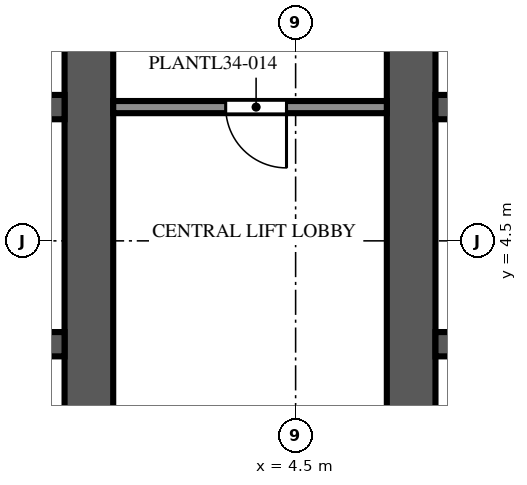
"""IFC4 building model, lengths in metres.
Left out: names, types, materials, properties, quantities, classifications, styles, units other than length and angle.
Written with IfcOpenShell. Run it as: python <this file> out.ifc"""

import sys

from ifc_helpers import new_model, si_unit, direction, frame, frame_2d, origin, place, context, subcontext, project, spatial, rectangle, extrude, element, fill, save


model = new_model("IFC4")
c1 = context("Model", 3, precision=1e-05, world=origin(), true_north=direction((0.0, 1.0)))
c2 = subcontext(c1, "Body", "Model", "MODEL_VIEW")
j1 = project(units=[si_unit("LENGTHUNIT", "METRE"), si_unit("PLANEANGLEUNIT", "RADIAN")], contexts=[c1])
p1 = place(None, origin())
s1 = spatial("IfcSite", under=j1, at=p1, CompositionType="ELEMENT")
p2 = place(p1, origin())
s2 = spatial("IfcBuilding", under=s1, at=p2, CompositionType="ELEMENT")
p3 = place(p2, frame((0.0, 0.0, 151.4)))
s3 = spatial("IfcBuildingStorey", under=s2, at=p3, CompositionType="ELEMENT", Elevation=151.4)
p4 = place(p3, frame((1.1, -9.0, 0.0), z_axis=(0.0, 0.0, 1.0), x_axis=(0.0, 1.0, 0.0)))
e1 = element("IfcWall", 1, at=p4, inside=s3, PredefinedType="SHEAR", context=c2, shape_type="SweptSolid", body=[
    extrude(rectangle(XDim=27.5, YDim=0.8, at=frame_2d((13.75, 0.0))), origin(), (0.0, 0.0, 1.0), 5.4),
])
p5 = place(p4, frame((12.55, 0.0, 0.0)))
e2 = element("IfcOpeningElement", 2, at=p5, cuts=e1, PredefinedType="OPENING", context=c2, shape_type="SweptSolid", body=[
    extrude(rectangle(XDim=2.4, YDim=2.4, at=frame_2d((1.2, 1.2))), frame((0.0, 0.41, 0.0), z_axis=(0.0, -1.0, 0.0), x_axis=(1.0, 0.0, 0.0)), (0.0, 0.0, 1.0), 0.82),
])
p6 = place(p4, frame((5.45, 0.0, 0.0)))
e3 = element("IfcOpeningElement", 3, at=p6, cuts=e1, PredefinedType="OPENING", context=c2, shape_type="SweptSolid", body=[
    extrude(rectangle(XDim=1.2, YDim=2.1, at=frame_2d((0.6, 1.05))), frame((0.0, 0.41, 0.0), z_axis=(0.0, -1.0, 0.0), x_axis=(1.0, 0.0, 0.0)), (0.0, 0.0, 1.0), 0.82),
])
p7 = place(p4, frame((19.45, 0.0, 0.0)))
e4 = element("IfcOpeningElement", 4, at=p7, cuts=e1, PredefinedType="OPENING", context=c2, shape_type="SweptSolid", body=[
    extrude(rectangle(XDim=1.0, YDim=2.1, at=frame_2d((0.5, 1.05))), frame((0.0, 0.41, 0.0), z_axis=(0.0, -1.0, 0.0), x_axis=(1.0, 0.0, 0.0)), (0.0, 0.0, 1.0), 0.82),
])
p8 = place(p4, frame((21.137, 0.0, 0.0)))
e5 = element("IfcOpeningElement", 5, at=p8, cuts=e1, PredefinedType="OPENING", context=c2, shape_type="SweptSolid", body=[
    extrude(rectangle(XDim=1.0, YDim=2.1, at=frame_2d((0.5, 1.05))), frame((0.0, 0.41, 0.0), z_axis=(0.0, -1.0, 0.0), x_axis=(1.0, 0.0, 0.0)), (0.0, 0.0, 1.0), 0.82),
])
p9 = place(p4, frame((23.2, 0.0, 0.0)))
e6 = element("IfcOpeningElement", 6, at=p9, cuts=e1, PredefinedType="OPENING", context=c2, shape_type="SweptSolid", body=[
    extrude(rectangle(XDim=1.0, YDim=2.1, at=frame_2d((0.5, 1.05))), frame((0.0, 0.41, 0.0), z_axis=(0.0, -1.0, 0.0), x_axis=(1.0, 0.0, 0.0)), (0.0, 0.0, 1.0), 0.82),
])
p10 = place(p4, frame((25.262, 0.0, 0.0)))
e7 = element("IfcOpeningElement", 7, at=p10, cuts=e1, PredefinedType="OPENING", context=c2, shape_type="SweptSolid", body=[
    extrude(rectangle(XDim=1.0, YDim=2.1, at=frame_2d((0.5, 1.05))), frame((0.0, 0.41, 0.0), z_axis=(0.0, -1.0, 0.0), x_axis=(1.0, 0.0, 0.0)), (0.0, 0.0, 1.0), 0.82),
])
p11 = place(p3, frame((-9.7, 2.8, 0.0), z_axis=(0.0, 0.0, 1.0), x_axis=(1.0, 0.0, 0.0)))
e8 = element("IfcWall", 8, at=p11, inside=s3, PredefinedType="SHEAR", context=c2, shape_type="SweptSolid", body=[
    extrude(rectangle(XDim=10.4, YDim=0.4, at=frame_2d((5.2, 0.0))), origin(), (0.0, 0.0, 1.0), 5.4),
])
p12 = place(p11, frame((0.738, 0.0, 0.0)))
e9 = element("IfcOpeningElement", 9, at=p12, cuts=e8, PredefinedType="OPENING", context=c2, shape_type="SweptSolid", body=[
    extrude(rectangle(XDim=1.1, YDim=2.1, at=frame_2d((0.55, 1.05))), frame((0.0, 0.21, 0.0), z_axis=(0.0, -1.0, 0.0), x_axis=(1.0, 0.0, 0.0)), (0.0, 0.0, 1.0), 0.42),
])
p13 = place(p11, frame((3.337, 0.0, 0.0)))
e10 = element("IfcOpeningElement", 10, at=p13, cuts=e8, PredefinedType="OPENING", context=c2, shape_type="SweptSolid", body=[
    extrude(rectangle(XDim=1.1, YDim=2.1, at=frame_2d((0.55, 1.05))), frame((0.0, 0.21, 0.0), z_axis=(0.0, -1.0, 0.0), x_axis=(1.0, 0.0, 0.0)), (0.0, 0.0, 1.0), 0.42),
])
p14 = place(p11, frame((5.962, 0.0, 0.0)))
e11 = element("IfcOpeningElement", 11, at=p14, cuts=e8, PredefinedType="OPENING", context=c2, shape_type="SweptSolid", body=[
    extrude(rectangle(XDim=1.1, YDim=2.1, at=frame_2d((0.55, 1.05))), frame((0.0, 0.21, 0.0), z_axis=(0.0, -1.0, 0.0), x_axis=(1.0, 0.0, 0.0)), (0.0, 0.0, 1.0), 0.42),
])
p15 = place(p11, frame((8.613, 0.0, 0.0)))
e12 = element("IfcOpeningElement", 12, at=p15, cuts=e8, PredefinedType="OPENING", context=c2, shape_type="SweptSolid", body=[
    extrude(rectangle(XDim=1.0, YDim=2.1, at=frame_2d((0.5, 1.05))), frame((0.0, 0.21, 0.0), z_axis=(0.0, -1.0, 0.0), x_axis=(1.0, 0.0, 0.0)), (0.0, 0.0, 1.0), 0.42),
])
p16 = place(p3, frame((-9.7, 6.7, 0.0), z_axis=(0.0, 0.0, 1.0), x_axis=(1.0, 0.0, 0.0)))
e13 = element("IfcWall", 13, at=p16, inside=s3, PredefinedType="SHEAR", context=c2, shape_type="SweptSolid", body=[
    extrude(rectangle(XDim=10.4, YDim=0.4, at=frame_2d((5.2, 0.0))), origin(), (0.0, 0.0, 1.0), 5.4),
])
p17 = place(p16, frame((3.337, 0.0, 0.0)))
e14 = element("IfcOpeningElement", 14, at=p17, cuts=e13, PredefinedType="OPENING", context=c2, shape_type="SweptSolid", body=[
    extrude(rectangle(XDim=1.1, YDim=2.1, at=frame_2d((0.55, 1.05))), frame((0.0, 0.21, 0.0), z_axis=(0.0, -1.0, 0.0), x_axis=(1.0, 0.0, 0.0)), (0.0, 0.0, 1.0), 0.42),
])
p18 = place(p16, frame((5.962, 0.0, 0.0)))
e15 = element("IfcOpeningElement", 15, at=p18, cuts=e13, PredefinedType="OPENING", context=c2, shape_type="SweptSolid", body=[
    extrude(rectangle(XDim=1.1, YDim=2.1, at=frame_2d((0.55, 1.05))), frame((0.0, 0.21, 0.0), z_axis=(0.0, -1.0, 0.0), x_axis=(1.0, 0.0, 0.0)), (0.0, 0.0, 1.0), 0.42),
])
p19 = place(p16, frame((8.663, 0.0, 0.0)))
e16 = element("IfcOpeningElement", 16, at=p19, cuts=e13, PredefinedType="OPENING", context=c2, shape_type="SweptSolid", body=[
    extrude(rectangle(XDim=1.1, YDim=2.1, at=frame_2d((0.55, 1.05))), frame((0.0, 0.21, 0.0), z_axis=(0.0, -1.0, 0.0), x_axis=(1.0, 0.0, 0.0)), (0.0, 0.0, 1.0), 0.42),
])
p20 = place(p16, frame((0.688, 0.0, 0.0)))
e17 = element("IfcOpeningElement", 17, at=p20, cuts=e13, PredefinedType="OPENING", context=c2, shape_type="SweptSolid", body=[
    extrude(rectangle(XDim=1.0, YDim=2.1, at=frame_2d((0.5, 1.05))), frame((0.0, 0.21, 0.0), z_axis=(0.0, -1.0, 0.0), x_axis=(1.0, 0.0, 0.0)), (0.0, 0.0, 1.0), 0.42),
])
p21 = place(p3, frame((6.4, -9.0, 0.0), z_axis=(0.0, 0.0, 1.0), x_axis=(0.0, 1.0, 0.0)))
e18 = element("IfcWall", 18, at=p21, inside=s3, PredefinedType="SHEAR", context=c2, shape_type="SweptSolid", body=[
    extrude(rectangle(XDim=27.5, YDim=0.8, at=frame_2d((13.75, 0.0))), origin(), (0.0, 0.0, 1.0), 5.4),
])
p22 = place(p21, frame((12.55, 0.0, 0.0)))
e19 = element("IfcOpeningElement", 19, at=p22, cuts=e18, PredefinedType="OPENING", context=c2, shape_type="SweptSolid", body=[
    extrude(rectangle(XDim=2.4, YDim=2.4, at=frame_2d((1.2, 1.2))), frame((0.0, 0.41, 0.0), z_axis=(0.0, -1.0, 0.0), x_axis=(1.0, 0.0, 0.0)), (0.0, 0.0, 1.0), 0.82),
])
p23 = place(p21, frame((5.45, 0.0, 0.0)))
e20 = element("IfcOpeningElement", 20, at=p23, cuts=e18, PredefinedType="OPENING", context=c2, shape_type="SweptSolid", body=[
    extrude(rectangle(XDim=1.2, YDim=2.1, at=frame_2d((0.6, 1.05))), frame((0.0, 0.41, 0.0), z_axis=(0.0, -1.0, 0.0), x_axis=(1.0, 0.0, 0.0)), (0.0, 0.0, 1.0), 0.82),
])
p24 = place(p21, frame((19.45, 0.0, 0.0)))
e21 = element("IfcOpeningElement", 21, at=p24, cuts=e18, PredefinedType="OPENING", context=c2, shape_type="SweptSolid", body=[
    extrude(rectangle(XDim=1.0, YDim=2.1, at=frame_2d((0.5, 1.05))), frame((0.0, 0.41, 0.0), z_axis=(0.0, -1.0, 0.0), x_axis=(1.0, 0.0, 0.0)), (0.0, 0.0, 1.0), 0.82),
])
p25 = place(p21, frame((21.137, 0.0, 0.0)))
e22 = element("IfcOpeningElement", 22, at=p25, cuts=e18, PredefinedType="OPENING", context=c2, shape_type="SweptSolid", body=[
    extrude(rectangle(XDim=1.0, YDim=2.1, at=frame_2d((0.5, 1.05))), frame((0.0, 0.41, 0.0), z_axis=(0.0, -1.0, 0.0), x_axis=(1.0, 0.0, 0.0)), (0.0, 0.0, 1.0), 0.82),
])
p26 = place(p21, frame((23.2, 0.0, 0.0)))
e23 = element("IfcOpeningElement", 23, at=p26, cuts=e18, PredefinedType="OPENING", context=c2, shape_type="SweptSolid", body=[
    extrude(rectangle(XDim=1.0, YDim=2.1, at=frame_2d((0.5, 1.05))), frame((0.0, 0.41, 0.0), z_axis=(0.0, -1.0, 0.0), x_axis=(1.0, 0.0, 0.0)), (0.0, 0.0, 1.0), 0.82),
])
p27 = place(p21, frame((25.262, 0.0, 0.0)))
e24 = element("IfcOpeningElement", 24, at=p27, cuts=e18, PredefinedType="OPENING", context=c2, shape_type="SweptSolid", body=[
    extrude(rectangle(XDim=1.0, YDim=2.1, at=frame_2d((0.5, 1.05))), frame((0.0, 0.41, 0.0), z_axis=(0.0, -1.0, 0.0), x_axis=(1.0, 0.0, 0.0)), (0.0, 0.0, 1.0), 0.82),
])
p28 = place(p3, frame((6.8, 2.8, 0.0), z_axis=(0.0, 0.0, 1.0), x_axis=(1.0, 0.0, 0.0)))
e25 = element("IfcWall", 25, at=p28, inside=s3, PredefinedType="SHEAR", context=c2, shape_type="SweptSolid", body=[
    extrude(rectangle(XDim=10.4, YDim=0.4, at=frame_2d((5.2, 0.0))), origin(), (0.0, 0.0, 1.0), 5.4),
])
p29 = place(p28, frame((0.738, 0.0, 0.0)))
e26 = element("IfcOpeningElement", 26, at=p29, cuts=e25, PredefinedType="OPENING", context=c2, shape_type="SweptSolid", body=[
    extrude(rectangle(XDim=1.1, YDim=2.1, at=frame_2d((0.55, 1.05))), frame((0.0, 0.21, 0.0), z_axis=(0.0, -1.0, 0.0), x_axis=(1.0, 0.0, 0.0)), (0.0, 0.0, 1.0), 0.42),
])
p30 = place(p28, frame((3.337, 0.0, 0.0)))
e27 = element("IfcOpeningElement", 27, at=p30, cuts=e25, PredefinedType="OPENING", context=c2, shape_type="SweptSolid", body=[
    extrude(rectangle(XDim=1.1, YDim=2.1, at=frame_2d((0.55, 1.05))), frame((0.0, 0.21, 0.0), z_axis=(0.0, -1.0, 0.0), x_axis=(1.0, 0.0, 0.0)), (0.0, 0.0, 1.0), 0.42),
])
p31 = place(p28, frame((5.962, 0.0, 0.0)))
e28 = element("IfcOpeningElement", 28, at=p31, cuts=e25, PredefinedType="OPENING", context=c2, shape_type="SweptSolid", body=[
    extrude(rectangle(XDim=1.1, YDim=2.1, at=frame_2d((0.55, 1.05))), frame((0.0, 0.21, 0.0), z_axis=(0.0, -1.0, 0.0), x_axis=(1.0, 0.0, 0.0)), (0.0, 0.0, 1.0), 0.42),
])
p32 = place(p28, frame((8.613, 0.0, 0.0)))
e29 = element("IfcOpeningElement", 29, at=p32, cuts=e25, PredefinedType="OPENING", context=c2, shape_type="SweptSolid", body=[
    extrude(rectangle(XDim=1.0, YDim=2.1, at=frame_2d((0.5, 1.05))), frame((0.0, 0.21, 0.0), z_axis=(0.0, -1.0, 0.0), x_axis=(1.0, 0.0, 0.0)), (0.0, 0.0, 1.0), 0.42),
])
p33 = place(p3, frame((6.8, 6.7, 0.0), z_axis=(0.0, 0.0, 1.0), x_axis=(1.0, 0.0, 0.0)))
e30 = element("IfcWall", 30, at=p33, inside=s3, PredefinedType="SHEAR", context=c2, shape_type="SweptSolid", body=[
    extrude(rectangle(XDim=10.4, YDim=0.4, at=frame_2d((5.2, 0.0))), origin(), (0.0, 0.0, 1.0), 5.4),
])
p34 = place(p33, frame((3.337, 0.0, 0.0)))
e31 = element("IfcOpeningElement", 31, at=p34, cuts=e30, PredefinedType="OPENING", context=c2, shape_type="SweptSolid", body=[
    extrude(rectangle(XDim=1.1, YDim=2.1, at=frame_2d((0.55, 1.05))), frame((0.0, 0.21, 0.0), z_axis=(0.0, -1.0, 0.0), x_axis=(1.0, 0.0, 0.0)), (0.0, 0.0, 1.0), 0.42),
])
p35 = place(p33, frame((5.962, 0.0, 0.0)))
e32 = element("IfcOpeningElement", 32, at=p35, cuts=e30, PredefinedType="OPENING", context=c2, shape_type="SweptSolid", body=[
    extrude(rectangle(XDim=1.1, YDim=2.1, at=frame_2d((0.55, 1.05))), frame((0.0, 0.21, 0.0), z_axis=(0.0, -1.0, 0.0), x_axis=(1.0, 0.0, 0.0)), (0.0, 0.0, 1.0), 0.42),
])
p36 = place(p33, frame((8.663, 0.0, 0.0)))
e33 = element("IfcOpeningElement", 33, at=p36, cuts=e30, PredefinedType="OPENING", context=c2, shape_type="SweptSolid", body=[
    extrude(rectangle(XDim=1.1, YDim=2.1, at=frame_2d((0.55, 1.05))), frame((0.0, 0.21, 0.0), z_axis=(0.0, -1.0, 0.0), x_axis=(1.0, 0.0, 0.0)), (0.0, 0.0, 1.0), 0.42),
])
p37 = place(p33, frame((0.688, 0.0, 0.0)))
e34 = element("IfcOpeningElement", 34, at=p37, cuts=e30, PredefinedType="OPENING", context=c2, shape_type="SweptSolid", body=[
    extrude(rectangle(XDim=1.0, YDim=2.1, at=frame_2d((0.5, 1.05))), frame((0.0, 0.21, 0.0), z_axis=(0.0, -1.0, 0.0), x_axis=(1.0, 0.0, 0.0)), (0.0, 0.0, 1.0), 0.42),
])
p38 = place(p3, frame((1.5, 6.7, 0.0), z_axis=(0.0, 0.0, 1.0), x_axis=(1.0, 0.0, 0.0)))
e35 = element("IfcWall", 35, at=p38, inside=s3, PredefinedType="PARTITIONING", context=c2, shape_type="SweptSolid", body=[
    extrude(rectangle(XDim=4.5, YDim=0.2, at=frame_2d((2.25, 0.0))), origin(), (0.0, 0.0, 1.0), 4.95),
])
p39 = place(p38, frame((1.85, 0.0, 0.0)))
e36 = element("IfcOpeningElement", 36, at=p39, cuts=e35, PredefinedType="OPENING", context=c2, shape_type="SweptSolid", body=[
    extrude(rectangle(XDim=1.0, YDim=2.1, at=frame_2d((0.5, 1.05))), frame((0.0, 0.11, 0.0), z_axis=(0.0, -1.0, 0.0), x_axis=(1.0, 0.0, 0.0)), (0.0, 0.0, 1.0), 0.22),
])
p40 = place(p5, origin())
e37 = element("IfcDoor", 37, at=p40, inside=s3, OperationType="DOUBLE_DOOR_DOUBLE_SWING", PredefinedType="DOOR", context=c2, shape_type="SweptSolid", body=[
    extrude(rectangle(XDim=2.4, YDim=2.4, at=frame_2d((1.2, 1.2))), frame((0.0, 0.025, 0.0), z_axis=(0.0, -1.0, 0.0), x_axis=(1.0, 0.0, 0.0)), (0.0, 0.0, 1.0), 0.05),
])
fill(e2, e37)
p41 = place(p22, origin())
e38 = element("IfcDoor", 38, at=p41, inside=s3, OperationType="DOUBLE_DOOR_DOUBLE_SWING", PredefinedType="DOOR", context=c2, shape_type="SweptSolid", body=[
    extrude(rectangle(XDim=2.4, YDim=2.4, at=frame_2d((1.2, 1.2))), frame((0.0, 0.025, 0.0), z_axis=(0.0, -1.0, 0.0), x_axis=(1.0, 0.0, 0.0)), (0.0, 0.0, 1.0), 0.05),
])
fill(e19, e38)
p42 = place(p39, origin())
e39 = element("IfcDoor", 39, at=p42, inside=s3, OperationType="SINGLE_SWING_RIGHT", PredefinedType="DOOR", context=c2, shape_type="SweptSolid", body=[
    extrude(rectangle(XDim=1.0, YDim=2.1, at=frame_2d((0.5, 1.05))), frame((0.0, 0.025, 0.0), z_axis=(0.0, -1.0, 0.0), x_axis=(1.0, 0.0, 0.0)), (0.0, 0.0, 1.0), 0.05),
])
fill(e36, e39)
save(model, sys.argv[1])
